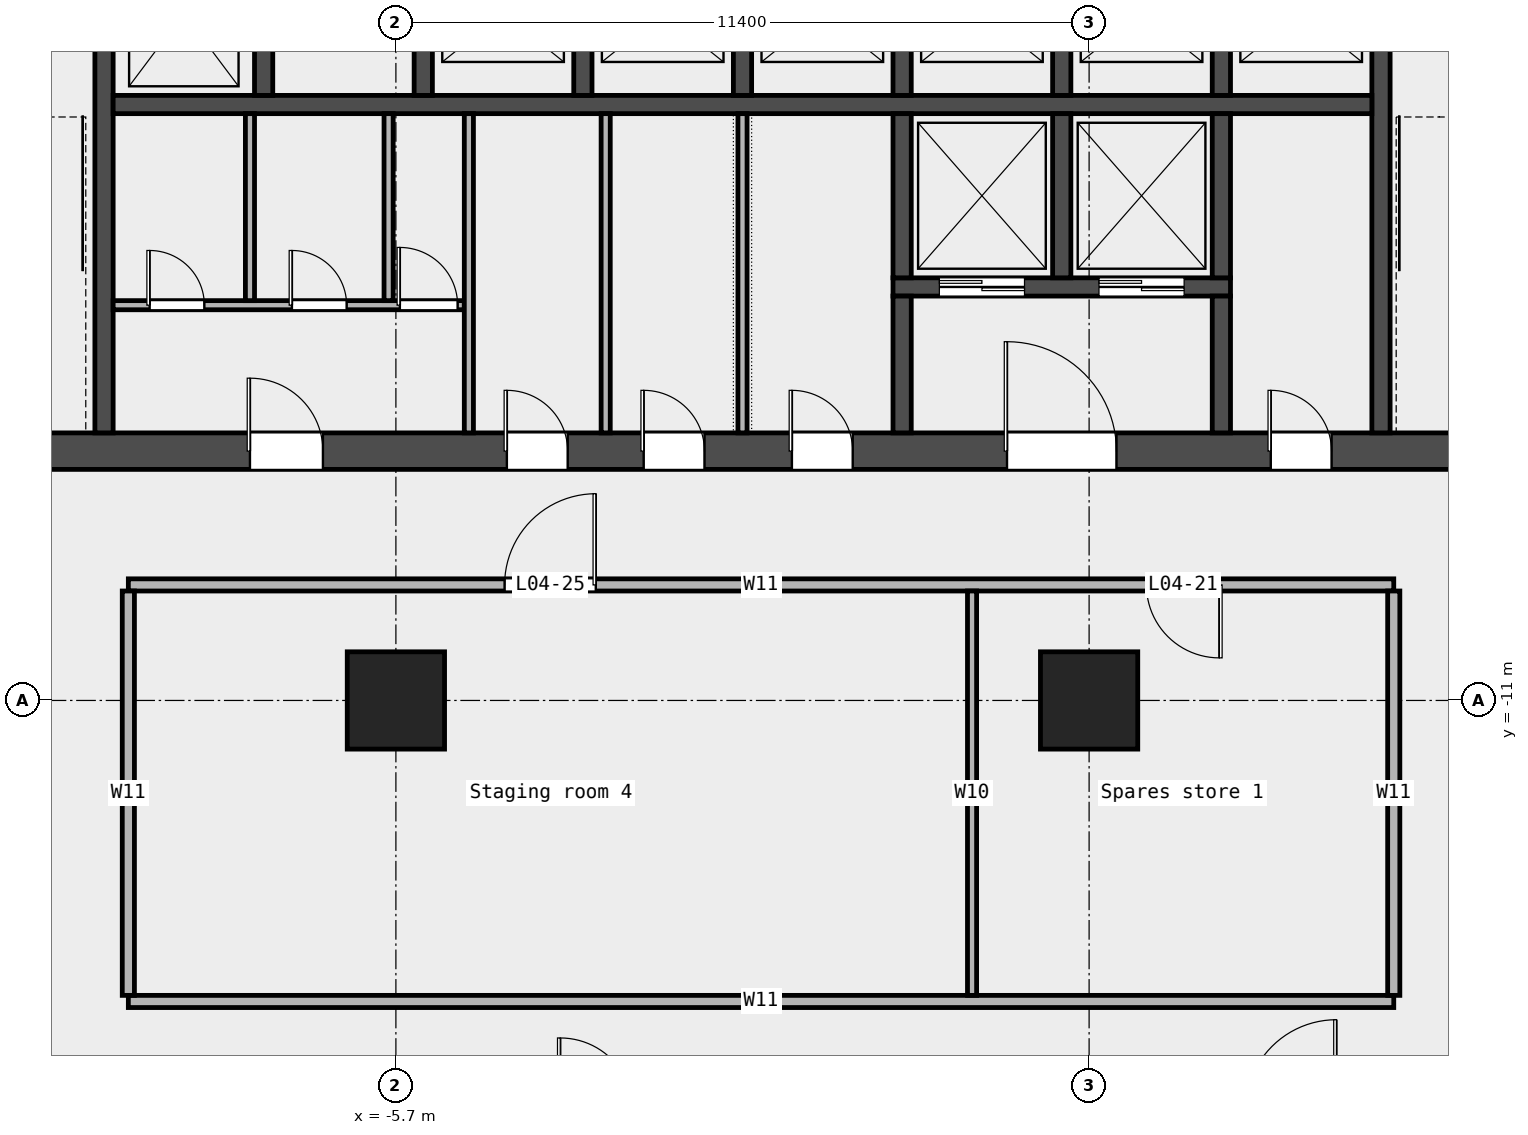
"""IFC4 building model, lengths in metres.
Left out: names, types, materials, properties, quantities, classifications, styles, units other than length and angle.
Written with IfcOpenShell. Run it as: python <this file> out.ifc"""

import sys

from ifc_helpers import new_model, si_unit, direction, frame, frame_2d, origin, origin_2d, place, context, subcontext, project, spatial, rectangle, extrude, element, fill, save


model = new_model("IFC4")
c1 = context("Model", 3, precision=1e-05, world=origin(), true_north=direction((0.0, 1.0)))
c2 = subcontext(c1, "Body", "Model", "MODEL_VIEW")
j1 = project(units=[si_unit("LENGTHUNIT", "METRE"), si_unit("PLANEANGLEUNIT", "RADIAN")], contexts=[c1])
p1 = place(None, origin())
s1 = spatial("IfcSite", under=j1, at=p1, CompositionType="ELEMENT")
p2 = place(p1, origin())
s2 = spatial("IfcBuilding", under=s1, at=p2, CompositionType="ELEMENT")
p3 = place(p2, frame((0.0, 0.0, 25.5)))
s3 = spatial("IfcBuildingStorey", under=s2, at=p3, CompositionType="ELEMENT", Elevation=25.5)
for number, where, z_axis, x_axis in (
    (1, (-5.7, -11.0, 0.0), (0.0, 0.0, 1.0), (1.0, 0.0, 0.0)),
    (2, (5.7, -11.0, 0.0), (0.0, 0.0, 1.0), (1.0, 0.0, 0.0)),
):
    element("IfcColumn", number, at=place(p3, frame(where, z_axis=z_axis, x_axis=x_axis)), inside=s3, PredefinedType="COLUMN", context=c2, shape_type="SweptSolid", body=[
        extrude(rectangle(XDim=1.6, YDim=1.6, at=origin_2d()), origin(), (0.0, 0.0, 1.0), 5.05),
    ])
p4 = place(p3, frame((-10.1, -15.95, 0.0), z_axis=(0.0, 0.0, 1.0), x_axis=(1.0, 0.0, 0.0)))
e3 = element("IfcWall", 3, at=p4, inside=s3, PredefinedType="PARTITIONING", context=c2, shape_type="SweptSolid", body=[
    extrude(rectangle(XDim=20.81, YDim=0.2, at=frame_2d((10.405, 0.0))), origin(), (0.0, 0.0, 1.0), 5.05),
])
p5 = place(p3, frame((-10.1, -9.1, 0.0), z_axis=(0.0, 0.0, 1.0), x_axis=(1.0, 0.0, 0.0)))
e4 = element("IfcWall", 4, at=p5, inside=s3, PredefinedType="PARTITIONING", context=c2, shape_type="SweptSolid", body=[
    extrude(rectangle(XDim=20.81, YDim=0.2, at=frame_2d((10.405, 0.0))), origin(), (0.0, 0.0, 1.0), 5.05),
])
p6 = place(p5, frame((16.742, 0.0, 0.0)))
e5 = element("IfcOpeningElement", 5, at=p6, cuts=e4, PredefinedType="OPENING", context=c2, shape_type="SweptSolid", body=[
    extrude(rectangle(XDim=1.2, YDim=2.1, at=frame_2d((0.6, 1.05))), frame((0.0, 0.112, 0.0), z_axis=(0.0, -1.0, 0.0), x_axis=(1.0, 0.0, 0.0)), (0.0, 0.0, 1.0), 0.224),
])
p7 = place(p5, frame((6.188, 0.0, 0.0)))
e6 = element("IfcOpeningElement", 6, at=p7, cuts=e4, PredefinedType="OPENING", context=c2, shape_type="SweptSolid", body=[
    extrude(rectangle(XDim=1.5, YDim=2.1, at=frame_2d((0.75, 1.05))), frame((0.0, 0.112, 0.0), z_axis=(0.0, -1.0, 0.0), x_axis=(1.0, 0.0, 0.0)), (0.0, 0.0, 1.0), 0.224),
])
p8 = place(p3, frame((-10.1, -15.85, 0.0), z_axis=(0.0, 0.0, 1.0), x_axis=(0.0, 1.0, 0.0)))
e7 = element("IfcWall", 7, at=p8, inside=s3, PredefinedType="PARTITIONING", context=c2, shape_type="SweptSolid", body=[
    extrude(rectangle(XDim=6.65, YDim=0.2, at=frame_2d((3.325, 0.0))), origin(), (0.0, 0.0, 1.0), 5.05),
])
p9 = place(p3, frame((3.775, -15.85, 0.0), z_axis=(0.0, 0.0, 1.0), x_axis=(0.0, 1.0, 0.0)))
e8 = element("IfcWall", 8, at=p9, inside=s3, PredefinedType="PARTITIONING", context=c2, shape_type="SweptSolid", body=[
    extrude(rectangle(XDim=6.65, YDim=0.15, at=frame_2d((3.325, 0.0))), origin(), (0.0, 0.0, 1.0), 5.05),
])
p10 = place(p3, frame((10.71, -15.85, 0.0), z_axis=(0.0, 0.0, 1.0), x_axis=(0.0, 1.0, 0.0)))
e9 = element("IfcWall", 9, at=p10, inside=s3, PredefinedType="PARTITIONING", context=c2, shape_type="SweptSolid", body=[
    extrude(rectangle(XDim=6.65, YDim=0.2, at=frame_2d((3.325, 0.0))), origin(), (0.0, 0.0, 1.0), 5.05),
])
p11 = place(p3, frame((-14.4, -6.9, 0.0), z_axis=(0.0, 0.0, 1.0), x_axis=(1.0, 0.0, 0.0)))
e10 = element("IfcWall", 10, at=p11, inside=s3, PredefinedType="SHEAR", context=c2, shape_type="SweptSolid", body=[
    extrude(rectangle(XDim=28.8, YDim=0.6, at=frame_2d((14.4, 0.0))), origin(), (0.0, 0.0, 1.0), 5.2),
])
p12 = place(p11, frame((6.3, 0.0, 0.0)))
e11 = element("IfcOpeningElement", 11, at=p12, cuts=e10, PredefinedType="OPENING", context=c2, shape_type="SweptSolid", body=[
    extrude(rectangle(XDim=1.2, YDim=2.1, at=frame_2d((0.6, 1.05))), frame((0.0, 0.312, 0.0), z_axis=(0.0, -1.0, 0.0), x_axis=(1.0, 0.0, 0.0)), (0.0, 0.0, 1.0), 0.624),
])
p13 = place(p11, frame((10.525, 0.0, 0.0)))
e12 = element("IfcOpeningElement", 12, at=p13, cuts=e10, PredefinedType="OPENING", context=c2, shape_type="SweptSolid", body=[
    extrude(rectangle(XDim=1.0, YDim=2.1, at=frame_2d((0.5, 1.05))), frame((0.0, 0.312, 0.0), z_axis=(0.0, -1.0, 0.0), x_axis=(1.0, 0.0, 0.0)), (0.0, 0.0, 1.0), 0.624),
])
p14 = place(p11, frame((12.775, 0.0, 0.0)))
e13 = element("IfcOpeningElement", 13, at=p14, cuts=e10, PredefinedType="OPENING", context=c2, shape_type="SweptSolid", body=[
    extrude(rectangle(XDim=1.0, YDim=2.1, at=frame_2d((0.5, 1.05))), frame((0.0, 0.312, 0.0), z_axis=(0.0, -1.0, 0.0), x_axis=(1.0, 0.0, 0.0)), (0.0, 0.0, 1.0), 0.624),
])
p15 = place(p11, frame((15.212, 0.0, 0.0)))
e14 = element("IfcOpeningElement", 14, at=p15, cuts=e10, PredefinedType="OPENING", context=c2, shape_type="SweptSolid", body=[
    extrude(rectangle(XDim=1.0, YDim=2.1, at=frame_2d((0.5, 1.05))), frame((0.0, 0.312, 0.0), z_axis=(0.0, -1.0, 0.0), x_axis=(1.0, 0.0, 0.0)), (0.0, 0.0, 1.0), 0.624),
])
p16 = place(p11, frame((18.75, 0.0, 0.0)))
e15 = element("IfcOpeningElement", 15, at=p16, cuts=e10, PredefinedType="OPENING", context=c2, shape_type="SweptSolid", body=[
    extrude(rectangle(XDim=1.8, YDim=2.1, at=frame_2d((0.9, 1.05))), frame((0.0, 0.312, 0.0), z_axis=(0.0, -1.0, 0.0), x_axis=(1.0, 0.0, 0.0)), (0.0, 0.0, 1.0), 0.624),
])
p17 = place(p11, frame((23.087, 0.0, 0.0)))
e16 = element("IfcOpeningElement", 16, at=p17, cuts=e10, PredefinedType="OPENING", context=c2, shape_type="SweptSolid", body=[
    extrude(rectangle(XDim=1.0, YDim=2.1, at=frame_2d((0.5, 1.05))), frame((0.0, 0.312, 0.0), z_axis=(0.0, -1.0, 0.0), x_axis=(1.0, 0.0, 0.0)), (0.0, 0.0, 1.0), 0.624),
])
for number, where, z_axis, x_axis in (
    (17, (-10.5, -6.6, 0.0), (0.0, 0.0, 1.0), (0.0, 1.0, 0.0)),
    (18, (10.5, -6.6, 0.0), (0.0, 0.0, 1.0), (0.0, 1.0, 0.0)),
):
    element("IfcWall", number, at=place(p3, frame(where, z_axis=z_axis, x_axis=x_axis)), inside=s3, PredefinedType="SHEAR", context=c2, shape_type="SweptSolid", body=[
        extrude(rectangle(XDim=8.55, YDim=0.3, at=frame_2d((4.275, 0.0))), origin(), (0.0, 0.0, 1.0), 5.2),
    ])
p18 = place(p3, frame((-10.35, -1.2, 0.0), z_axis=(0.0, 0.0, 1.0), x_axis=(1.0, 0.0, 0.0)))
e19 = element("IfcWall", 19, at=p18, inside=s3, PredefinedType="SOLIDWALL", context=c2, shape_type="SweptSolid", body=[
    extrude(rectangle(XDim=20.7, YDim=0.3, at=frame_2d((10.35, 0.0))), origin(), (0.0, 0.0, 1.0), 5.2),
])
for number, where, z_axis, x_axis in (
    (20, (-7.875, -1.05, 0.0), (0.0, 0.0, 1.0), (0.0, 1.0, 0.0)),
    (21, (-5.25, -1.05, 0.0), (0.0, 0.0, 1.0), (0.0, 1.0, 0.0)),
    (22, (-2.625, -1.05, 0.0), (0.0, 0.0, 1.0), (0.0, 1.0, 0.0)),
    (23, (0.0, -1.05, 0.0), (0.0, 0.0, 1.0), (0.0, 1.0, 0.0)),
    (24, (2.625, -1.05, 0.0), (0.0, 0.0, 1.0), (0.0, 1.0, 0.0)),
    (25, (5.25, -1.05, 0.0), (0.0, 0.0, 1.0), (0.0, 1.0, 0.0)),
    (26, (7.875, -1.05, 0.0), (0.0, 0.0, 1.0), (0.0, 1.0, 0.0)),
):
    element("IfcWall", number, at=place(p3, frame(where, z_axis=z_axis, x_axis=x_axis)), inside=s3, PredefinedType="SOLIDWALL", context=c2, shape_type="SweptSolid", body=[
        extrude(rectangle(XDim=2.7, YDim=0.3, at=frame_2d((1.35, 0.0))), origin(), (0.0, 0.0, 1.0), 5.2),
    ])
p19 = place(p3, frame((2.475, -4.2, 0.0), z_axis=(0.0, 0.0, 1.0), x_axis=(1.0, 0.0, 0.0)))
e27 = element("IfcWall", 27, at=p19, inside=s3, PredefinedType="SOLIDWALL", context=c2, shape_type="SweptSolid", body=[
    extrude(rectangle(XDim=5.55, YDim=0.3, at=frame_2d((2.775, 0.0))), origin(), (0.0, 0.0, 1.0), 5.2),
])
p20 = place(p19, frame((0.762, 0.0, 0.0)))
e28 = element("IfcOpeningElement", 28, at=p20, cuts=e27, PredefinedType="OPENING", context=c2, shape_type="SweptSolid", body=[
    extrude(rectangle(XDim=1.4, YDim=2.1, at=frame_2d((0.7, 1.05))), frame((0.0, 0.162, 0.0), z_axis=(0.0, -1.0, 0.0), x_axis=(1.0, 0.0, 0.0)), (0.0, 0.0, 1.0), 0.324),
])
p21 = place(p19, frame((3.387, 0.0, 0.0)))
e29 = element("IfcOpeningElement", 29, at=p21, cuts=e27, PredefinedType="OPENING", context=c2, shape_type="SweptSolid", body=[
    extrude(rectangle(XDim=1.4, YDim=2.1, at=frame_2d((0.7, 1.05))), frame((0.0, 0.162, 0.0), z_axis=(0.0, -1.0, 0.0), x_axis=(1.0, 0.0, 0.0)), (0.0, 0.0, 1.0), 0.324),
])
p22 = place(p3, frame((2.625, -4.05, 0.0), z_axis=(0.0, 0.0, 1.0), x_axis=(0.0, 1.0, 0.0)))
e30 = element("IfcWall", 30, at=p22, inside=s3, PredefinedType="SOLIDWALL", context=c2, shape_type="SweptSolid", body=[
    extrude(rectangle(XDim=2.7, YDim=0.3, at=frame_2d((1.35, 0.0))), origin(), (0.0, 0.0, 1.0), 5.2),
])
p23 = place(p3, frame((2.625, -6.6, 0.0), z_axis=(0.0, 0.0, 1.0), x_axis=(0.0, 1.0, 0.0)))
e31 = element("IfcWall", 31, at=p23, inside=s3, PredefinedType="SOLIDWALL", context=c2, shape_type="SweptSolid", body=[
    extrude(rectangle(XDim=2.25, YDim=0.3, at=frame_2d((1.125, 0.0))), origin(), (0.0, 0.0, 1.0), 5.2),
])
for number, where, z_axis, x_axis in (
    (32, (5.25, -4.05, 0.0), (0.0, 0.0, 1.0), (0.0, 1.0, 0.0)),
    (33, (7.875, -4.05, 0.0), (0.0, 0.0, 1.0), (0.0, 1.0, 0.0)),
):
    element("IfcWall", number, at=place(p3, frame(where, z_axis=z_axis, x_axis=x_axis)), inside=s3, PredefinedType="SOLIDWALL", context=c2, shape_type="SweptSolid", body=[
        extrude(rectangle(XDim=2.7, YDim=0.3, at=frame_2d((1.35, 0.0))), origin(), (0.0, 0.0, 1.0), 5.2),
    ])
p24 = place(p3, frame((7.875, -6.6, 0.0), z_axis=(0.0, 0.0, 1.0), x_axis=(0.0, 1.0, 0.0)))
e34 = element("IfcWall", 34, at=p24, inside=s3, PredefinedType="SOLIDWALL", context=c2, shape_type="SweptSolid", body=[
    extrude(rectangle(XDim=2.25, YDim=0.3, at=frame_2d((1.125, 0.0))), origin(), (0.0, 0.0, 1.0), 5.2),
])
p25 = place(p3, frame((-10.35, -4.5, 0.0), z_axis=(0.0, 0.0, 1.0), x_axis=(1.0, 0.0, 0.0)))
e35 = element("IfcWall", 35, at=p25, inside=s3, PredefinedType="PARTITIONING", context=c2, shape_type="SweptSolid", body=[
    extrude(rectangle(XDim=5.775, YDim=0.15, at=frame_2d((2.888, 0.0))), origin(), (0.0, 0.0, 1.0), 5.2),
])
p26 = place(p25, frame((0.6, 0.0, 0.0)))
e36 = element("IfcOpeningElement", 36, at=p26, cuts=e35, PredefinedType="OPENING", context=c2, shape_type="SweptSolid", body=[
    extrude(rectangle(XDim=0.9, YDim=2.1, at=frame_2d((0.45, 1.05))), frame((0.0, 0.087, 0.0), z_axis=(0.0, -1.0, 0.0), x_axis=(1.0, 0.0, 0.0)), (0.0, 0.0, 1.0), 0.174),
])
p27 = place(p25, frame((2.94, 0.0, 0.0)))
e37 = element("IfcOpeningElement", 37, at=p27, cuts=e35, PredefinedType="OPENING", context=c2, shape_type="SweptSolid", body=[
    extrude(rectangle(XDim=0.9, YDim=2.1, at=frame_2d((0.45, 1.05))), frame((0.0, 0.087, 0.0), z_axis=(0.0, -1.0, 0.0), x_axis=(1.0, 0.0, 0.0)), (0.0, 0.0, 1.0), 0.174),
])
p28 = place(p25, frame((4.715, 0.0, 0.0)))
e38 = element("IfcOpeningElement", 38, at=p28, cuts=e35, PredefinedType="OPENING", context=c2, shape_type="SweptSolid", body=[
    extrude(rectangle(XDim=0.95, YDim=2.1, at=frame_2d((0.475, 1.05))), frame((0.0, 0.087, 0.0), z_axis=(0.0, -1.0, 0.0), x_axis=(1.0, 0.0, 0.0)), (0.0, 0.0, 1.0), 0.174),
])
for number, where, z_axis, x_axis in (
    (39, (-8.1, -4.425, 0.0), (0.0, 0.0, 1.0), (0.0, 1.0, 0.0)),
    (40, (-5.82, -4.425, 0.0), (0.0, 0.0, 1.0), (0.0, 1.0, 0.0)),
):
    element("IfcWall", number, at=place(p3, frame(where, z_axis=z_axis, x_axis=x_axis)), inside=s3, PredefinedType="PARTITIONING", context=c2, shape_type="SweptSolid", body=[
        extrude(rectangle(XDim=3.075, YDim=0.15, at=frame_2d((1.538, 0.0))), origin(), (0.0, 0.0, 1.0), 5.2),
    ])
for number, where, z_axis, x_axis in (
    (41, (-4.5, -6.6, 0.0), (0.0, 0.0, 1.0), (0.0, 1.0, 0.0)),
    (42, (-2.25, -6.6, 0.0), (0.0, 0.0, 1.0), (0.0, 1.0, 0.0)),
    (43, (0.0, -6.6, 0.0), (0.0, 0.0, 1.0), (0.0, 1.0, 0.0)),
):
    element("IfcWall", number, at=place(p3, frame(where, z_axis=z_axis, x_axis=x_axis)), inside=s3, PredefinedType="PARTITIONING", context=c2, shape_type="SweptSolid", body=[
        extrude(rectangle(XDim=5.25, YDim=0.15, at=frame_2d((2.625, 0.0))), origin(), (0.0, 0.0, 1.0), 5.2),
    ])
p29 = place(p6, origin())
e44 = element("IfcDoor", 44, at=p29, inside=s3, OperationType="SINGLE_SWING_LEFT", PredefinedType="DOOR", context=c2, shape_type="SweptSolid", body=[
    extrude(rectangle(XDim=1.2, YDim=2.1, at=frame_2d((0.6, 1.05))), frame((0.0, 0.025, 0.0), z_axis=(0.0, -1.0, 0.0), x_axis=(1.0, 0.0, 0.0)), (0.0, 0.0, 1.0), 0.05),
])
fill(e5, e44)
p30 = place(p7, origin())
e45 = element("IfcDoor", 45, at=p30, inside=s3, OperationType="DOUBLE_DOOR_SINGLE_SWING", PredefinedType="DOOR", context=c2, shape_type="SweptSolid", body=[
    extrude(rectangle(XDim=1.5, YDim=2.1, at=frame_2d((0.75, 1.05))), frame((0.0, 0.025, 0.0), z_axis=(0.0, -1.0, 0.0), x_axis=(1.0, 0.0, 0.0)), (0.0, 0.0, 1.0), 0.05),
])
fill(e6, e45)
p31 = place(p20, origin())
e46 = element("IfcDoor", 46, at=p31, inside=s3, OperationType="DOUBLE_DOOR_SLIDING", PredefinedType="DOOR", context=c2, shape_type="SweptSolid", body=[
    extrude(rectangle(XDim=1.4, YDim=2.1, at=frame_2d((0.7, 1.05))), frame((0.0, 0.025, 0.0), z_axis=(0.0, -1.0, 0.0), x_axis=(1.0, 0.0, 0.0)), (0.0, 0.0, 1.0), 0.05),
])
fill(e28, e46)
p32 = place(p21, origin())
e47 = element("IfcDoor", 47, at=p32, inside=s3, OperationType="DOUBLE_DOOR_SLIDING", PredefinedType="DOOR", context=c2, shape_type="SweptSolid", body=[
    extrude(rectangle(XDim=1.4, YDim=2.1, at=frame_2d((0.7, 1.05))), frame((0.0, 0.025, 0.0), z_axis=(0.0, -1.0, 0.0), x_axis=(1.0, 0.0, 0.0)), (0.0, 0.0, 1.0), 0.05),
])
fill(e29, e47)
p33 = place(p12, origin())
e48 = element("IfcDoor", 48, at=p33, inside=s3, OperationType="SINGLE_SWING_LEFT", PredefinedType="DOOR", context=c2, shape_type="SweptSolid", body=[
    extrude(rectangle(XDim=1.2, YDim=2.1, at=frame_2d((0.6, 1.05))), frame((0.0, 0.025, 0.0), z_axis=(0.0, -1.0, 0.0), x_axis=(1.0, 0.0, 0.0)), (0.0, 0.0, 1.0), 0.05),
])
fill(e11, e48)
p34 = place(p26, origin())
e49 = element("IfcDoor", 49, at=p34, inside=s3, OperationType="SINGLE_SWING_LEFT", PredefinedType="DOOR", context=c2, shape_type="SweptSolid", body=[
    extrude(rectangle(XDim=0.9, YDim=2.1, at=frame_2d((0.45, 1.05))), frame((0.0, 0.025, 0.0), z_axis=(0.0, -1.0, 0.0), x_axis=(1.0, 0.0, 0.0)), (0.0, 0.0, 1.0), 0.05),
])
fill(e36, e49)
p35 = place(p27, origin())
e50 = element("IfcDoor", 50, at=p35, inside=s3, OperationType="SINGLE_SWING_LEFT", PredefinedType="DOOR", context=c2, shape_type="SweptSolid", body=[
    extrude(rectangle(XDim=0.9, YDim=2.1, at=frame_2d((0.45, 1.05))), frame((0.0, 0.025, 0.0), z_axis=(0.0, -1.0, 0.0), x_axis=(1.0, 0.0, 0.0)), (0.0, 0.0, 1.0), 0.05),
])
fill(e37, e50)
p36 = place(p28, origin())
e51 = element("IfcDoor", 51, at=p36, inside=s3, OperationType="SINGLE_SWING_LEFT", PredefinedType="DOOR", context=c2, shape_type="SweptSolid", body=[
    extrude(rectangle(XDim=0.95, YDim=2.1, at=frame_2d((0.475, 1.05))), frame((0.0, 0.025, 0.0), z_axis=(0.0, -1.0, 0.0), x_axis=(1.0, 0.0, 0.0)), (0.0, 0.0, 1.0), 0.05),
])
fill(e38, e51)
p37 = place(p13, origin())
e52 = element("IfcDoor", 52, at=p37, inside=s3, OperationType="SINGLE_SWING_LEFT", PredefinedType="DOOR", context=c2, shape_type="SweptSolid", body=[
    extrude(rectangle(XDim=1.0, YDim=2.1, at=frame_2d((0.5, 1.05))), frame((0.0, 0.025, 0.0), z_axis=(0.0, -1.0, 0.0), x_axis=(1.0, 0.0, 0.0)), (0.0, 0.0, 1.0), 0.05),
])
fill(e12, e52)
p38 = place(p14, origin())
e53 = element("IfcDoor", 53, at=p38, inside=s3, OperationType="SINGLE_SWING_LEFT", PredefinedType="DOOR", context=c2, shape_type="SweptSolid", body=[
    extrude(rectangle(XDim=1.0, YDim=2.1, at=frame_2d((0.5, 1.05))), frame((0.0, 0.025, 0.0), z_axis=(0.0, -1.0, 0.0), x_axis=(1.0, 0.0, 0.0)), (0.0, 0.0, 1.0), 0.05),
])
fill(e13, e53)
p39 = place(p15, origin())
e54 = element("IfcDoor", 54, at=p39, inside=s3, OperationType="SINGLE_SWING_LEFT", PredefinedType="DOOR", context=c2, shape_type="SweptSolid", body=[
    extrude(rectangle(XDim=1.0, YDim=2.1, at=frame_2d((0.5, 1.05))), frame((0.0, 0.025, 0.0), z_axis=(0.0, -1.0, 0.0), x_axis=(1.0, 0.0, 0.0)), (0.0, 0.0, 1.0), 0.05),
])
fill(e14, e54)
p40 = place(p16, origin())
e55 = element("IfcDoor", 55, at=p40, inside=s3, OperationType="DOUBLE_DOOR_SINGLE_SWING", PredefinedType="DOOR", context=c2, shape_type="SweptSolid", body=[
    extrude(rectangle(XDim=1.8, YDim=2.1, at=frame_2d((0.9, 1.05))), frame((0.0, 0.025, 0.0), z_axis=(0.0, -1.0, 0.0), x_axis=(1.0, 0.0, 0.0)), (0.0, 0.0, 1.0), 0.05),
])
fill(e15, e55)
p41 = place(p17, origin())
e56 = element("IfcDoor", 56, at=p41, inside=s3, OperationType="SINGLE_SWING_LEFT", PredefinedType="DOOR", context=c2, shape_type="SweptSolid", body=[
    extrude(rectangle(XDim=1.0, YDim=2.1, at=frame_2d((0.5, 1.05))), frame((0.0, 0.025, 0.0), z_axis=(0.0, -1.0, 0.0), x_axis=(1.0, 0.0, 0.0)), (0.0, 0.0, 1.0), 0.05),
])
fill(e16, e56)
save(model, sys.argv[1])
